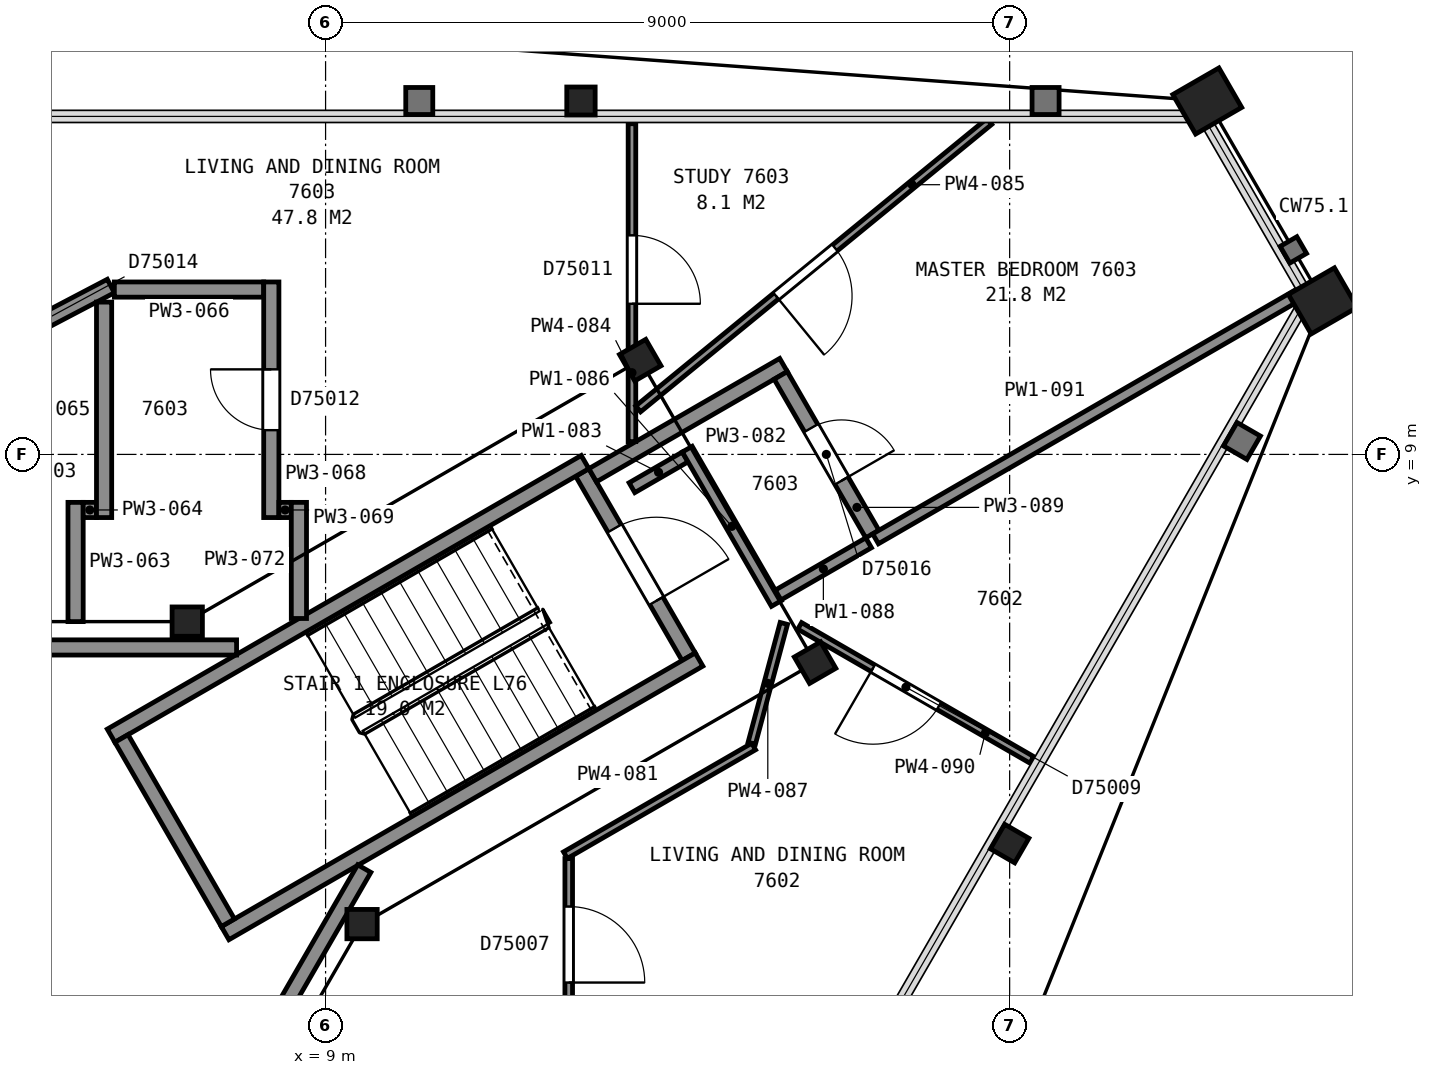
"""IFC4 building model, lengths in metres.
Left out: names, types, materials, properties, quantities, classifications, styles, units other than length and angle.
Written with IfcOpenShell. Run it as: python <this file> out.ifc"""

import sys

from ifc_helpers import new_model, si_unit, direction, frame, frame_2d, origin, origin_2d, place, context, subcontext, project, spatial, rectangle, hollow_rectangle, i_section, extrude, element, fill, save


model = new_model("IFC4")
c1 = context("Model", 3, precision=1e-05, world=origin(), true_north=direction((0.0, 1.0)))
c2 = subcontext(c1, "Body", "Model", "MODEL_VIEW")
j1 = project(units=[si_unit("LENGTHUNIT", "METRE"), si_unit("PLANEANGLEUNIT", "RADIAN")], contexts=[c1])
p1 = place(None, origin())
s1 = spatial("IfcSite", under=j1, at=p1, CompositionType="ELEMENT")
p2 = place(p1, origin())
s2 = spatial("IfcBuilding", under=s1, at=p2, CompositionType="ELEMENT")
p3 = place(p2, frame((0.0, 0.0, 301.0)))
s3 = spatial("IfcBuildingStorey", under=s2, at=p3, CompositionType="ELEMENT", Elevation=301.0)
p4 = place(p3, frame((20.6, 13.65, 0.0), z_axis=(0.0, 0.0, 1.0), x_axis=(0.5, -0.866025403784, 0.0)))
e1 = element("IfcColumn", 1, at=p4, inside=s3, PredefinedType="COLUMN", context=c2, shape_type="SweptSolid", body=[
    extrude(hollow_rectangle(XDim=0.6, YDim=0.7, WallThickness=0.04, at=origin_2d()), origin(), (0.0, 0.0, 1.0), 3.61),
])
for number, where, z_axis, x_axis in (
    (2, (12.36, 13.65, 0.0), (0.0, 0.0, 1.0), (1.0, 0.0, 0.0)),
    (3, (18.0, 3.88, 0.0), (0.0, 0.0, 1.0), (-0.5, -0.866, 0.0)),
):
    element("IfcColumn", number, at=place(p3, frame(where, z_axis=z_axis, x_axis=x_axis)), inside=s3, PredefinedType="COLUMN", context=c2, shape_type="SweptSolid", body=[
        extrude(i_section(OverallWidth=0.373, OverallDepth=0.368, WebThickness=0.015, FlangeThickness=0.024, FilletRadius=0.015, at=origin_2d()), origin(), (0.0, 0.0, 1.0), 3.645),
    ])
p5 = place(p3, frame((22.12, 11.02, 0.0), z_axis=(0.0, 0.0, 1.0), x_axis=(0.5, -0.866025403784, 0.0)))
e4 = element("IfcColumn", 4, at=p5, inside=s3, PredefinedType="COLUMN", context=c2, shape_type="SweptSolid", body=[
    extrude(hollow_rectangle(XDim=0.6, YDim=0.7, WallThickness=0.04, at=origin_2d()), origin(), (0.0, 0.0, 1.0), 3.61),
])
p6 = place(p3, frame((9.48, 2.82, 0.0), z_axis=(0.0, 0.0, 1.0), x_axis=(1.0, 0.0, 0.0)))
e5 = element("IfcColumn", 5, at=p6, inside=s3, PredefinedType="COLUMN", context=c2, shape_type="SweptSolid", body=[
    extrude(i_section(OverallWidth=0.399, OverallDepth=0.386, WebThickness=0.021, FlangeThickness=0.033, FilletRadius=0.015, at=origin_2d()), origin(), (0.0, 0.0, 1.0), 3.7),
])
for number, where, z_axis, x_axis in (
    (6, (15.44, 6.26, 0.0), (0.0, 0.0, 1.0), (0.5, -0.866, 0.0)),
    (7, (13.14, 10.24, 0.0), (0.0, 0.0, 1.0), (0.5, -0.866, 0.0)),
):
    element("IfcColumn", number, at=place(p3, frame(where, z_axis=z_axis, x_axis=x_axis)), inside=s3, PredefinedType="COLUMN", context=c2, shape_type="SweptSolid", body=[
        extrude(i_section(OverallWidth=0.401, OverallDepth=0.399, WebThickness=0.025, FlangeThickness=0.04, FilletRadius=0.015, at=origin_2d()), origin(), (0.0, 0.0, 1.0), 3.7),
    ])
p7 = place(p3, frame((7.18, 6.8, 0.0), z_axis=(0.0, 0.0, 1.0), x_axis=(1.0, 0.0, 0.0)))
e8 = element("IfcColumn", 8, at=p7, inside=s3, PredefinedType="COLUMN", context=c2, shape_type="SweptSolid", body=[
    extrude(i_section(OverallWidth=0.399, OverallDepth=0.386, WebThickness=0.021, FlangeThickness=0.033, FilletRadius=0.015, at=origin_2d()), origin(), (0.0, 0.0, 1.0), 3.7),
])
p8 = place(p3, frame((13.777, 6.338, 0.0), z_axis=(0.0, 0.0, 1.0), x_axis=(-0.500049511043, 0.865996816683, 0.0)))
e9 = element("IfcWall", 9, at=p8, inside=s3, PredefinedType="PARTITIONING", context=c2, shape_type="SweptSolid", body=[
    extrude(rectangle(XDim=2.8, YDim=0.2, at=frame_2d((1.4, 0.0))), origin(), (0.0, 0.0, 1.0), 3.45),
])
p9 = place(p8, frame((0.85, 0.0, 0.0)))
e10 = element("IfcOpeningElement", 10, at=p9, cuts=e9, PredefinedType="OPENING", context=c2, shape_type="SweptSolid", body=[
    extrude(rectangle(XDim=1.1, YDim=2.1, at=frame_2d((0.55, 1.05))), frame((0.0, 0.11, 0.0), z_axis=(0.0, -1.0, 0.0), x_axis=(1.0, 0.0, 0.0)), (0.0, 0.0, 1.0), 0.22),
])
for number, where, z_axis, x_axis in (
    (11, (6.178, 5.299, 0.0), (0.0, 0.0, 1.0), (0.866, 0.5, 0.0)),
    (12, (7.678, 2.701, 0.0), (0.0, 0.0, 1.0), (0.866, 0.5, 0.0)),
):
    element("IfcWall", number, at=place(p3, frame(where, z_axis=z_axis, x_axis=x_axis)), inside=s3, PredefinedType="PARTITIONING", context=c2, shape_type="SweptSolid", body=[
        extrude(rectangle(XDim=7.2, YDim=0.2, at=frame_2d((3.6, 0.0))), origin(), (0.0, 0.0, 1.0), 3.45),
    ])
p10 = place(p3, frame((7.715, 2.838, 0.0), z_axis=(0.0, 0.0, 1.0), x_axis=(-0.500049511043, 0.865996816683, 0.0)))
e13 = element("IfcWall", 13, at=p10, inside=s3, PredefinedType="PARTITIONING", context=c2, shape_type="SweptSolid", body=[
    extrude(rectangle(XDim=2.8, YDim=0.2, at=frame_2d((1.4, 0.0))), origin(), (0.0, 0.0, 1.0), 3.45),
])
p11 = place(p3, frame((7.829, 6.46, 0.0), z_axis=(0.0, 0.0, 1.0), x_axis=(-1.0, 0.0, 0.0)))
e14 = element("IfcWall", 14, at=p11, inside=s3, PredefinedType="PARTITIONING", context=c2, shape_type="SweptSolid", body=[
    extrude(rectangle(XDim=15.658, YDim=0.2, at=frame_2d((7.829, 0.0))), origin(), (0.0, 0.0, 1.0), 3.45),
])
p12 = place(p11, frame((12.168, 0.0, 0.0)))
e15 = element("IfcOpeningElement", 15, at=p12, cuts=e14, PredefinedType="OPENING", context=c2, shape_type="SweptSolid", body=[
    extrude(rectangle(XDim=1.2, YDim=2.1, at=frame_2d((0.6, 1.05))), frame((0.0, 0.11, 0.0), z_axis=(0.0, -1.0, 0.0), x_axis=(1.0, 0.0, 0.0)), (0.0, 0.0, 1.0), 0.22),
])
p13 = place(p3, frame((3.828, -6.29, 0.0), z_axis=(0.0, 0.0, 1.0), x_axis=(0.499979739078, 0.866037101117, 0.0)))
e16 = element("IfcWall", 16, at=p13, inside=s3, PredefinedType="PARTITIONING", context=c2, shape_type="SweptSolid", body=[
    extrude(rectangle(XDim=11.363, YDim=0.2, at=frame_2d((5.681, 0.0))), origin(), (0.0, 0.0, 1.0), 3.45),
])
p14 = place(p13, frame((0.55, 0.0, 0.0)))
e17 = element("IfcOpeningElement", 17, at=p14, cuts=e16, PredefinedType="OPENING", context=c2, shape_type="SweptSolid", body=[
    extrude(rectangle(XDim=1.2, YDim=2.1, at=frame_2d((0.6, 1.05))), frame((0.0, 0.11, 0.0), z_axis=(0.0, -1.0, 0.0), x_axis=(1.0, 0.0, 0.0)), (0.0, 0.0, 1.0), 0.22),
])
p15 = place(p3, frame((6.175, 11.216, 0.0), z_axis=(0.0, 0.0, 1.0), x_axis=(-0.885512941371, -0.464614712062, 0.0)))
e18 = element("IfcWall", 18, at=p15, inside=s3, PredefinedType="PARTITIONING", context=c2, shape_type="SweptSolid", body=[
    extrude(rectangle(XDim=3.362, YDim=0.2, at=frame_2d((1.681, 0.0))), origin(), (0.0, 0.0, 1.0), 2.723),
])
p16 = place(p15, frame((1.212, 0.0, 0.0)))
e19 = element("IfcOpeningElement", 19, at=p16, cuts=e18, PredefinedType="OPENING", context=c2, shape_type="SweptSolid", body=[
    extrude(rectangle(XDim=0.9, YDim=2.1, at=frame_2d((0.45, 1.05))), frame((0.0, 0.11, 0.0), z_axis=(0.0, -1.0, 0.0), x_axis=(1.0, 0.0, 0.0)), (0.0, 0.0, 1.0), 0.22),
])
p17 = place(p3, frame((5.711, 6.8, 0.0), z_axis=(0.0, 0.0, 1.0), x_axis=(0.0, 1.0, 0.0)))
e20 = element("IfcWall", 20, at=p17, inside=s3, PredefinedType="PARTITIONING", context=c2, shape_type="SweptSolid", body=[
    extrude(rectangle(XDim=1.569, YDim=0.2, at=frame_2d((0.784, 0.0))), origin(), (0.0, 0.0, 1.0), 2.723),
])
p18 = place(p3, frame((5.811, 8.269, 0.0), z_axis=(0.0, 0.0, 1.0), x_axis=(1.0, 0.0, 0.0)))
e21 = element("IfcWall", 21, at=p18, inside=s3, PredefinedType="PARTITIONING", context=c2, shape_type="SweptSolid", body=[
    extrude(rectangle(XDim=0.175, YDim=0.2, at=frame_2d((0.087, 0.0))), origin(), (0.0, 0.0, 1.0), 2.723),
])
p19 = place(p3, frame((6.086, 8.169, 0.0), z_axis=(0.0, 0.0, 1.0), x_axis=(0.0, 1.0, 0.0)))
e22 = element("IfcWall", 22, at=p19, inside=s3, PredefinedType="PARTITIONING", context=c2, shape_type="SweptSolid", body=[
    extrude(rectangle(XDim=2.835, YDim=0.2, at=frame_2d((1.417, 0.0))), origin(), (0.0, 0.0, 1.0), 2.723),
])
p20 = place(p3, frame((6.221, 11.169, 0.0), z_axis=(0.0, 0.0, 1.0), x_axis=(1.0, 0.0, 0.0)))
e23 = element("IfcWall", 23, at=p20, inside=s3, PredefinedType="PARTITIONING", context=c2, shape_type="SweptSolid", body=[
    extrude(rectangle(XDim=1.965, YDim=0.2, at=frame_2d((0.982, 0.0))), origin(), (0.0, 0.0, 1.0), 2.723),
])
p21 = place(p3, frame((8.286, 8.169, 0.0), z_axis=(0.0, 0.0, 1.0), x_axis=(0.0, 1.0, 0.0)))
e24 = element("IfcWall", 24, at=p21, inside=s3, PredefinedType="PARTITIONING", context=c2, shape_type="SweptSolid", body=[
    extrude(rectangle(XDim=3.1, YDim=0.2, at=frame_2d((1.55, 0.0))), origin(), (0.0, 0.0, 1.0), 2.723),
])
p22 = place(p21, frame((1.15, 0.0, 0.0)))
e25 = element("IfcOpeningElement", 25, at=p22, cuts=e24, PredefinedType="OPENING", context=c2, shape_type="SweptSolid", body=[
    extrude(rectangle(XDim=0.8, YDim=2.1, at=frame_2d((0.4, 1.05))), frame((0.0, 0.11, 0.0), z_axis=(0.0, -1.0, 0.0), x_axis=(1.0, 0.0, 0.0)), (0.0, 0.0, 1.0), 0.22),
])
p23 = place(p3, frame((8.386, 8.269, 0.0), z_axis=(0.0, 0.0, 1.0), x_axis=(1.0, 0.0, 0.0)))
e26 = element("IfcWall", 26, at=p23, inside=s3, PredefinedType="PARTITIONING", context=c2, shape_type="SweptSolid", body=[
    extrude(rectangle(XDim=0.163, YDim=0.2, at=frame_2d((0.082, 0.0))), origin(), (0.0, 0.0, 1.0), 2.723),
])
p24 = place(p3, frame((8.649, 6.841, 0.0), z_axis=(0.0, 0.0, 1.0), x_axis=(0.0, 1.0, 0.0)))
e27 = element("IfcWall", 27, at=p24, inside=s3, PredefinedType="PARTITIONING", context=c2, shape_type="SweptSolid", body=[
    extrude(rectangle(XDim=1.528, YDim=0.2, at=frame_2d((0.764, 0.0))), origin(), (0.0, 0.0, 1.0), 2.723),
])
p25 = place(p3, frame((12.199, 3.682, 0.0), z_axis=(0.0, 0.0, 1.0), x_axis=(0.0, -1.0, 0.0)))
e28 = element("IfcWall", 28, at=p25, inside=s3, PredefinedType="PARTITIONING", context=c2, shape_type="SweptSolid", body=[
    extrude(rectangle(XDim=2.331, YDim=0.1, at=frame_2d((1.166, 0.0))), origin(), (0.0, 0.0, 1.0), 2.723),
])
p26 = place(p25, frame((0.631, 0.0, 0.0)))
e29 = element("IfcOpeningElement", 29, at=p26, cuts=e28, PredefinedType="OPENING", context=c2, shape_type="SweptSolid", body=[
    extrude(rectangle(XDim=1.0, YDim=2.1, at=frame_2d((0.5, 1.05))), frame((0.0, 0.06, 0.0), z_axis=(0.0, -1.0, 0.0), x_axis=(1.0, 0.0, 0.0)), (0.0, 0.0, 1.0), 0.12),
])
p27 = place(p3, frame((12.156, 3.727, 0.0), z_axis=(0.0, 0.0, 1.0), x_axis=(0.866012137121, 0.500022977831, 0.0)))
e30 = element("IfcWall", 30, at=p27, inside=s3, PredefinedType="PARTITIONING", context=c2, shape_type="SweptSolid", body=[
    extrude(rectangle(XDim=2.86, YDim=0.1, at=frame_2d((1.43, 0.0))), origin(), (0.0, 0.0, 1.0), 2.723),
])
p28 = place(p3, frame((12.514, 8.726, 0.0), z_axis=(0.0, 0.0, 1.0), x_axis=(0.865969617579, 0.500096612097, 0.0)))
e31 = element("IfcWall", 31, at=p28, inside=s3, PredefinedType="PARTITIONING", context=c2, shape_type="SweptSolid", body=[
    extrude(rectangle(XDim=2.899, YDim=0.2, at=frame_2d((1.45, 0.0))), origin(), (0.0, 0.0, 1.0), 2.723),
])
p29 = place(p3, frame((13.031, 8.562, 0.0), z_axis=(0.0, 0.0, 1.0), x_axis=(0.865798205633, 0.500393312429, 0.0)))
e32 = element("IfcWall", 32, at=p29, inside=s3, PredefinedType="PARTITIONING", context=c2, shape_type="SweptSolid", body=[
    extrude(rectangle(XDim=0.808, YDim=0.15, at=frame_2d((0.404, 0.0))), origin(), (0.0, 0.0, 1.0), 2.723),
])
p30 = place(p3, frame((13.031, 13.351, 0.0), z_axis=(0.0, 0.0, 1.0), x_axis=(0.0, -1.0, 0.0)))
e33 = element("IfcWall", 33, at=p30, inside=s3, PredefinedType="PARTITIONING", context=c2, shape_type="SweptSolid", body=[
    extrude(rectangle(XDim=4.183, YDim=0.1, at=frame_2d((2.091, 0.0))), origin(), (0.0, 0.0, 1.0), 2.723),
])
p31 = place(p30, frame((1.469, 0.0, 0.0)))
e34 = element("IfcOpeningElement", 34, at=p31, cuts=e33, PredefinedType="OPENING", context=c2, shape_type="SweptSolid", body=[
    extrude(rectangle(XDim=0.9, YDim=2.1, at=frame_2d((0.45, 1.05))), frame((0.0, 0.06, 0.0), z_axis=(0.0, -1.0, 0.0), x_axis=(1.0, 0.0, 0.0)), (0.0, 0.0, 1.0), 0.12),
])
p32 = place(p3, frame((17.733, 13.38, 0.0), z_axis=(0.0, 0.0, 1.0), x_axis=(-0.773858908961, -0.633358025939, 0.0)))
e35 = element("IfcWall", 35, at=p32, inside=s3, PredefinedType="PARTITIONING", context=c2, shape_type="SweptSolid", body=[
    extrude(rectangle(XDim=5.97, YDim=0.1, at=frame_2d((2.985, 0.0))), origin(), (0.0, 0.0, 1.0), 2.723),
])
p33 = place(p32, frame((2.626, 0.0, 0.0)))
e36 = element("IfcOpeningElement", 36, at=p33, cuts=e35, PredefinedType="OPENING", context=c2, shape_type="SweptSolid", body=[
    extrude(rectangle(XDim=1.0, YDim=2.1, at=frame_2d((0.5, 1.05))), frame((0.0, 0.06, 0.0), z_axis=(0.0, -1.0, 0.0), x_axis=(1.0, 0.0, 0.0)), (0.0, 0.0, 1.0), 0.12),
])
p34 = place(p3, frame((13.759, 9.069, 0.0), z_axis=(0.0, 0.0, 1.0), x_axis=(0.500046885369, -0.865998332812, 0.0)))
e37 = element("IfcWall", 37, at=p34, inside=s3, PredefinedType="PARTITIONING", context=c2, shape_type="SweptSolid", body=[
    extrude(rectangle(XDim=2.345, YDim=0.15, at=frame_2d((1.172, 0.0))), origin(), (0.0, 0.0, 1.0), 2.723),
])
p35 = place(p3, frame((14.607, 5.2, 0.0), z_axis=(0.0, 0.0, 1.0), x_axis=(0.258519214507, 0.966006115783, 0.0)))
e38 = element("IfcWall", 38, at=p35, inside=s3, PredefinedType="PARTITIONING", context=c2, shape_type="SweptSolid", body=[
    extrude(rectangle(XDim=1.632, YDim=0.1, at=frame_2d((0.816, 0.0))), origin(), (0.0, 0.0, 1.0), 2.723),
])
p36 = place(p3, frame((14.954, 7.149, 0.0), z_axis=(0.0, 0.0, 1.0), x_axis=(0.865960792519, 0.5001118933, 0.0)))
e39 = element("IfcWall", 39, at=p36, inside=s3, PredefinedType="PARTITIONING", context=c2, shape_type="SweptSolid", body=[
    extrude(rectangle(XDim=1.375, YDim=0.15, at=frame_2d((0.688, 0.0))), origin(), (0.0, 0.0, 1.0), 2.723),
])
p37 = place(p3, frame((16.194, 7.952, 0.0), z_axis=(0.0, 0.0, 1.0), x_axis=(-0.500125724882, 0.865952804321, 0.0)))
e40 = element("IfcWall", 40, at=p37, inside=s3, PredefinedType="PARTITIONING", context=c2, shape_type="SweptSolid", body=[
    extrude(rectangle(XDim=2.411, YDim=0.2, at=frame_2d((1.205, 0.0))), origin(), (0.0, 0.0, 1.0), 2.723),
])
p38 = place(p37, frame((0.811, 0.0, 0.0)))
e41 = element("IfcOpeningElement", 41, at=p38, cuts=e40, PredefinedType="OPENING", context=c2, shape_type="SweptSolid", body=[
    extrude(rectangle(XDim=0.8, YDim=2.1, at=frame_2d((0.4, 1.05))), frame((0.0, 0.11, 0.0), z_axis=(0.0, -1.0, 0.0), x_axis=(1.0, 0.0, 0.0)), (0.0, 0.0, 1.0), 0.22),
])
p39 = place(p3, frame((15.238, 6.744, 0.0), z_axis=(0.0, 0.0, 1.0), x_axis=(0.866104892567, -0.49986229611, 0.0)))
e42 = element("IfcWall", 42, at=p39, inside=s3, PredefinedType="PARTITIONING", context=c2, shape_type="SweptSolid", body=[
    extrude(rectangle(XDim=3.526, YDim=0.1, at=frame_2d((1.763, 0.0))), origin(), (0.0, 0.0, 1.0), 2.723),
])
p40 = place(p39, frame((1.114, 0.0, 0.0)))
e43 = element("IfcOpeningElement", 43, at=p40, cuts=e42, PredefinedType="OPENING", context=c2, shape_type="SweptSolid", body=[
    extrude(rectangle(XDim=1.0, YDim=2.1, at=frame_2d((0.5, 1.05))), frame((0.0, 0.06, 0.0), z_axis=(0.0, -1.0, 0.0), x_axis=(1.0, 0.0, 0.0)), (0.0, 0.0, 1.0), 0.12),
])
p41 = place(p3, frame((16.236, 7.889, 0.0), z_axis=(0.0, 0.0, 1.0), x_axis=(0.865995456094, 0.500051867335, 0.0)))
e44 = element("IfcWall", 44, at=p41, inside=s3, PredefinedType="PARTITIONING", context=c2, shape_type="SweptSolid", body=[
    extrude(rectangle(XDim=6.415, YDim=0.15, at=frame_2d((3.208, 0.0))), origin(), (0.0, 0.0, 1.0), 2.723),
])
p42 = place(p9, origin())
e45 = element("IfcDoor", 45, at=p42, inside=s3, OperationType="SINGLE_SWING_LEFT", PredefinedType="DOOR", context=c2, shape_type="SweptSolid", body=[
    extrude(rectangle(XDim=1.1, YDim=2.1, at=frame_2d((0.55, 1.05))), frame((0.0, 0.025, 0.0), z_axis=(0.0, -1.0, 0.0), x_axis=(1.0, 0.0, 0.0)), (0.0, 0.0, 1.0), 0.05),
])
fill(e10, e45)
p43 = place(p22, origin())
e46 = element("IfcDoor", 46, at=p43, inside=s3, OperationType="SINGLE_SWING_RIGHT", PredefinedType="DOOR", context=c2, shape_type="SweptSolid", body=[
    extrude(rectangle(XDim=0.8, YDim=2.1, at=frame_2d((0.4, 1.05))), frame((0.0, 0.025, 0.0), z_axis=(0.0, -1.0, 0.0), x_axis=(1.0, 0.0, 0.0)), (0.0, 0.0, 1.0), 0.05),
])
fill(e25, e46)
p44 = place(p26, origin())
e47 = element("IfcDoor", 47, at=p44, inside=s3, OperationType="SINGLE_SWING_RIGHT", PredefinedType="DOOR", context=c2, shape_type="SweptSolid", body=[
    extrude(rectangle(XDim=1.0, YDim=2.1, at=frame_2d((0.5, 1.05))), frame((0.0, 0.025, 0.0), z_axis=(0.0, -1.0, 0.0), x_axis=(1.0, 0.0, 0.0)), (0.0, 0.0, 1.0), 0.05),
])
fill(e29, e47)
p45 = place(p31, origin())
e48 = element("IfcDoor", 48, at=p45, inside=s3, OperationType="SINGLE_SWING_RIGHT", PredefinedType="DOOR", context=c2, shape_type="SweptSolid", body=[
    extrude(rectangle(XDim=0.9, YDim=2.1, at=frame_2d((0.45, 1.05))), frame((0.0, 0.025, 0.0), z_axis=(0.0, -1.0, 0.0), x_axis=(1.0, 0.0, 0.0)), (0.0, 0.0, 1.0), 0.05),
])
fill(e34, e48)
p46 = place(p33, origin())
e49 = element("IfcDoor", 49, at=p46, inside=s3, OperationType="SINGLE_SWING_RIGHT", PredefinedType="DOOR", context=c2, shape_type="SweptSolid", body=[
    extrude(rectangle(XDim=1.0, YDim=2.1, at=frame_2d((0.5, 1.05))), frame((0.0, 0.025, 0.0), z_axis=(0.0, -1.0, 0.0), x_axis=(1.0, 0.0, 0.0)), (0.0, 0.0, 1.0), 0.05),
])
fill(e36, e49)
p47 = place(p38, origin())
e50 = element("IfcDoor", 50, at=p47, inside=s3, OperationType="SINGLE_SWING_LEFT", PredefinedType="DOOR", context=c2, shape_type="SweptSolid", body=[
    extrude(rectangle(XDim=0.8, YDim=2.1, at=frame_2d((0.4, 1.05))), frame((0.0, 0.025, 0.0), z_axis=(0.0, -1.0, 0.0), x_axis=(1.0, 0.0, 0.0)), (0.0, 0.0, 1.0), 0.05),
])
fill(e41, e50)
p48 = place(p40, origin())
e51 = element("IfcDoor", 51, at=p48, inside=s3, OperationType="SINGLE_SWING_LEFT", PredefinedType="DOOR", context=c2, shape_type="SweptSolid", body=[
    extrude(rectangle(XDim=1.0, YDim=2.1, at=frame_2d((0.5, 1.05))), frame((0.0, 0.025, 0.0), z_axis=(0.0, -1.0, 0.0), x_axis=(1.0, 0.0, 0.0)), (0.0, 0.0, 1.0), 0.05),
])
fill(e43, e51)
save(model, sys.argv[1])
